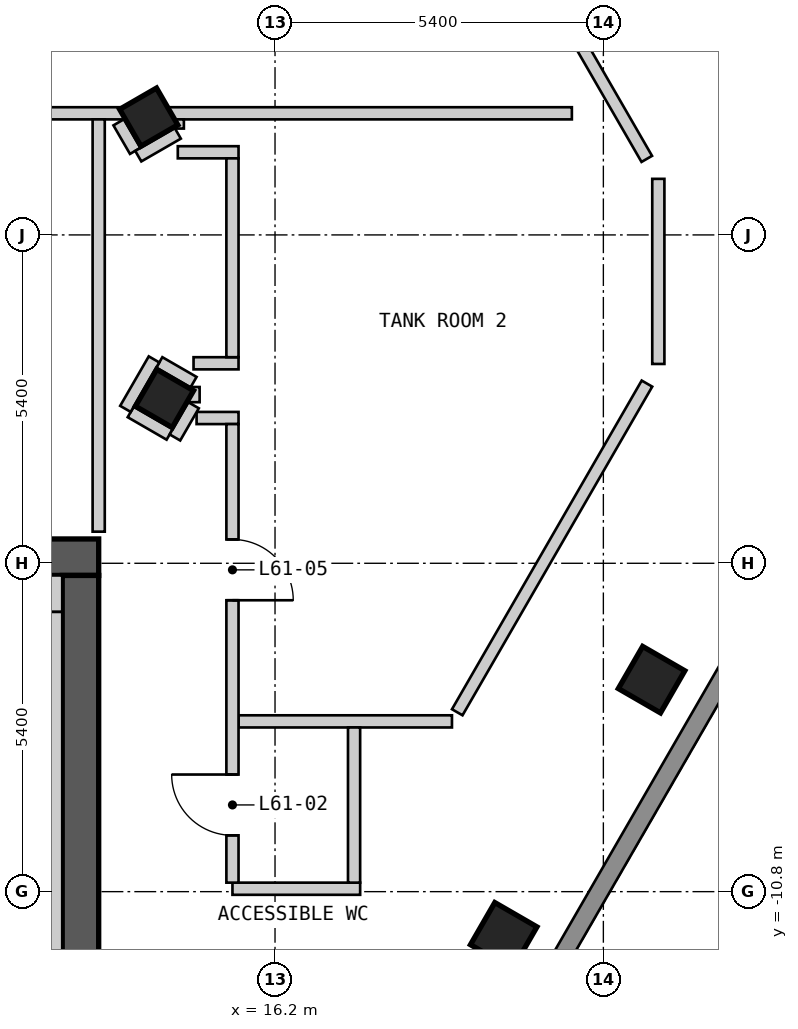
"""IFC4 building model, lengths in metres.
Left out: names, types, materials, properties, quantities, classifications, styles, units other than length and angle.
Written with IfcOpenShell. Run it as: python <this file> out.ifc"""

import sys

from ifc_helpers import new_model, si_unit, direction, frame, frame_2d, origin, origin_2d, place, context, subcontext, project, spatial, polyline, rectangle, outline, extrude, element, fill, save


model = new_model("IFC4")
c1 = context("Model", 3, precision=1e-05, world=origin(), true_north=direction((0.0, 1.0)))
c2 = subcontext(c1, "Body", "Model", "MODEL_VIEW")
j1 = project(units=[si_unit("LENGTHUNIT", "METRE"), si_unit("PLANEANGLEUNIT", "RADIAN")], contexts=[c1])
p1 = place(None, origin())
s1 = spatial("IfcSite", under=j1, at=p1, CompositionType="ELEMENT")
p2 = place(p1, origin())
s2 = spatial("IfcBuilding", under=s1, at=p2, CompositionType="ELEMENT")
p3 = place(p2, frame((0.0, 0.0, 199.2)))
s3 = spatial("IfcBuildingStorey", under=s2, at=p3, CompositionType="ELEMENT", Elevation=199.2)
for number, where, z_axis, x_axis in (
    (1, (19.961, -11.526, 0.0), (0.0, 0.0, 1.0), (0.5, 0.866, 0.0)),
    (2, (22.393, -7.314, 0.0), (0.0, 0.0, 1.0), (0.5, 0.866, 0.0)),
):
    element("IfcColumn", number, at=place(p3, frame(where, z_axis=z_axis, x_axis=x_axis)), inside=s3, PredefinedType="COLUMN", context=c2, shape_type="SweptSolid", body=[
        extrude(rectangle(XDim=0.8, YDim=0.8, at=origin_2d()), origin(), (0.0, 0.0, 1.0), 3.6),
    ])
for number, where, z_axis, x_axis in (
    (3, (14.382, -2.689, 0.0), (0.0, 0.0, 1.0), (0.5, 0.866, 0.0)),
    (4, (14.123, 1.937, 0.0), (0.0, 0.0, 1.0), (-0.5, 0.866, 0.0)),
):
    element("IfcColumn", number, at=place(p3, frame(where, z_axis=z_axis, x_axis=x_axis)), inside=s3, PredefinedType="COLUMN", context=c2, shape_type="SweptSolid", body=[
        extrude(rectangle(XDim=0.7, YDim=0.7, at=origin_2d()), origin(), (0.0, 0.0, 1.0), 3.6),
    ])
p4 = place(p3, frame((-13.3, -5.3, 0.0), z_axis=(0.0, 0.0, 1.0), x_axis=(1.0, 0.0, 0.0)))
e5 = element("IfcWall", 5, at=p4, inside=s3, PredefinedType="SHEAR", context=c2, shape_type="SweptSolid", body=[
    extrude(rectangle(XDim=26.6, YDim=0.6, at=frame_2d((13.3, 0.0))), origin(), (0.0, 0.0, 1.0), 2.6),
])
p5 = place(p4, frame((23.65, 0.0, 0.0)))
e6 = element("IfcOpeningElement", 6, at=p5, cuts=e5, PredefinedType="OPENING", context=c2, shape_type="SweptSolid", body=[
    extrude(rectangle(XDim=1.2, YDim=2.1, at=frame_2d((0.6, 1.05))), frame((0.0, 0.31, 0.0), z_axis=(0.0, -1.0, 0.0), x_axis=(1.0, 0.0, 0.0)), (0.0, 0.0, 1.0), 0.62),
])
p6 = place(p3, frame((13.0, -18.4, 0.0), z_axis=(0.0, 0.0, 1.0), x_axis=(0.0, 1.0, 0.0)))
e7 = element("IfcWall", 7, at=p6, inside=s3, PredefinedType="SHEAR", context=c2, shape_type="SweptSolid", body=[
    extrude(rectangle(XDim=12.8, YDim=0.6, at=frame_2d((6.4, 0.0))), origin(), (0.0, 0.0, 1.0), 2.6),
])
p7 = place(p3, frame((15.631, -21.025, 0.0), z_axis=(0.0, 0.0, 1.0), x_axis=(0.500018670445, 0.86601462413, 0.0)))
e8 = element("IfcWall", 8, at=p7, inside=s3, PredefinedType="SOLIDWALL", context=c2, shape_type="SweptSolid", body=[
    extrude(outline(polyline([(0.0, -0.15), (20.785, -0.15), (20.705, 0.15), (0.08, 0.15), (0.0, -0.15)])), origin(), (0.0, 0.0, 1.0), 2.6),
])
p8 = place(p3, frame((26.024, 1.825, 0.0), z_axis=(0.0, 0.0, 1.0), x_axis=(-0.500010537973, 0.866019319597, 0.0)))
e9 = element("IfcWall", 9, at=p8, inside=s3, PredefinedType="SOLIDWALL", context=c2, shape_type="SweptSolid", body=[
    extrude(outline(polyline([(0.0, -0.15), (22.863, -0.15), (22.783, 0.15), (0.08, 0.15), (0.0, -0.15)])), origin(), (0.0, 0.0, 1.0), 2.6),
])
p9 = place(p3, frame((15.5, -10.752, 0.0), z_axis=(0.0, 0.0, 1.0), x_axis=(1.0, 0.0, 0.0)))
e10 = element("IfcWall", 10, at=p9, inside=s3, PredefinedType="PARTITIONING", context=c2, shape_type="SweptSolid", body=[
    extrude(rectangle(XDim=2.1, YDim=0.2, at=frame_2d((1.05, 0.0))), origin(), (0.0, 0.0, 1.0), 2.6),
])
p10 = place(p3, frame((15.6, -8.0, 0.0), z_axis=(0.0, 0.0, 1.0), x_axis=(1.0, 0.0, 0.0)))
e11 = element("IfcWall", 11, at=p10, inside=s3, PredefinedType="SOLIDWALL", context=c2, shape_type="SweptSolid", body=[
    extrude(rectangle(XDim=3.51, YDim=0.2, at=frame_2d((1.755, 0.0))), origin(), (0.0, 0.0, 1.0), 2.6),
])
p11 = place(p3, frame((14.91, -3.011, 0.0), z_axis=(0.0, 0.0, 1.0), x_axis=(1.0, 0.0, 0.0)))
e12 = element("IfcWall", 12, at=p11, inside=s3, PredefinedType="SOLIDWALL", context=c2, shape_type="SweptSolid", body=[
    extrude(rectangle(XDim=0.69, YDim=0.2, at=frame_2d((0.345, 0.0))), origin(), (0.0, 0.0, 1.0), 2.6),
])
p12 = place(p3, frame((14.86, -2.111, 0.0), z_axis=(0.0, 0.0, 1.0), x_axis=(1.0, 0.0, 0.0)))
e13 = element("IfcWall", 13, at=p12, inside=s3, PredefinedType="SOLIDWALL", context=c2, shape_type="SweptSolid", body=[
    extrude(rectangle(XDim=0.74, YDim=0.2, at=frame_2d((0.37, 0.0))), origin(), (0.0, 0.0, 1.0), 2.6),
])
p13 = place(p3, frame((14.601, 1.359, 0.0), z_axis=(0.0, 0.0, 1.0), x_axis=(1.0, 0.0, 0.0)))
e14 = element("IfcWall", 14, at=p13, inside=s3, PredefinedType="SOLIDWALL", context=c2, shape_type="SweptSolid", body=[
    extrude(rectangle(XDim=0.999, YDim=0.2, at=frame_2d((0.5, 0.0))), origin(), (0.0, 0.0, 1.0), 2.6),
])
p14 = place(p3, frame((-21.482, 2.0, 0.0), z_axis=(0.0, 0.0, 1.0), x_axis=(1.0, 0.0, 0.0)))
e15 = element("IfcWall", 15, at=p14, inside=s3, PredefinedType="SOLIDWALL", context=c2, shape_type="SweptSolid", body=[
    extrude(rectangle(XDim=42.564, YDim=0.2, at=frame_2d((21.282, 0.0))), origin(), (0.0, 0.0, 1.0), 2.6),
])
p15 = place(p14, frame((4.432, 0.0, 0.0)))
e16 = element("IfcOpeningElement", 16, at=p15, cuts=e15, PredefinedType="OPENING", context=c2, shape_type="SweptSolid", body=[
    extrude(rectangle(XDim=1.0, YDim=2.1, at=frame_2d((0.5, 1.05))), frame((0.0, 0.11, 0.0), z_axis=(0.0, -1.0, 0.0), x_axis=(1.0, 0.0, 0.0)), (0.0, 0.0, 1.0), 0.22),
])
p16 = place(p14, frame((25.972, 0.0, 0.0)))
e17 = element("IfcOpeningElement", 17, at=p16, cuts=e15, PredefinedType="OPENING", context=c2, shape_type="SweptSolid", body=[
    extrude(rectangle(XDim=1.8, YDim=2.1, at=frame_2d((0.9, 1.05))), frame((0.0, 0.11, 0.0), z_axis=(0.0, -1.0, 0.0), x_axis=(1.0, 0.0, 0.0)), (0.0, 0.0, 1.0), 0.22),
])
p17 = place(p3, frame((13.3, -4.88, 0.0), z_axis=(0.0, 0.0, 1.0), x_axis=(0.0, 1.0, 0.0)))
e18 = element("IfcWall", 18, at=p17, inside=s3, PredefinedType="PARTITIONING", context=c2, shape_type="SweptSolid", body=[
    extrude(rectangle(XDim=6.78, YDim=0.2, at=frame_2d((3.39, 0.0))), origin(), (0.0, 0.0, 1.0), 2.6),
])
p18 = place(p3, frame((14.601, 1.749, 0.0), z_axis=(0.0, 0.0, 1.0), x_axis=(0.0, 1.0, 0.0)))
e19 = element("IfcWall", 19, at=p18, inside=s3, PredefinedType="SOLIDWALL", context=c2, shape_type="SweptSolid", body=[
    extrude(rectangle(XDim=0.151, YDim=0.2, at=frame_2d((0.075, 0.0))), origin(), (0.0, 0.0, 1.0), 2.6),
])
p19 = place(p3, frame((14.86, -2.751, 0.0), z_axis=(0.0, 0.0, 1.0), x_axis=(0.0, 1.0, 0.0)))
e20 = element("IfcWall", 20, at=p19, inside=s3, PredefinedType="SOLIDWALL", context=c2, shape_type="SweptSolid", body=[
    extrude(rectangle(XDim=0.25, YDim=0.2, at=frame_2d((0.125, 0.0))), origin(), (0.0, 0.0, 1.0), 2.6),
])
p20 = place(p3, frame((15.5, -10.652, 0.0), z_axis=(0.0, 0.0, 1.0), x_axis=(0.0, 1.0, 0.0)))
e21 = element("IfcWall", 21, at=p20, inside=s3, PredefinedType="SOLIDWALL", context=c2, shape_type="SweptSolid", body=[
    extrude(rectangle(XDim=7.541, YDim=0.2, at=frame_2d((3.771, 0.0))), origin(), (0.0, 0.0, 1.0), 2.6),
])
p21 = place(p20, frame((1.778, 0.0, 0.0), z_axis=(0.0, 0.0, 1.0), x_axis=(-1.0, 0.0, 0.0)))
e22 = element("IfcOpeningElement", 22, at=p21, cuts=e21, PredefinedType="OPENING", context=c2, shape_type="SweptSolid", body=[
    extrude(rectangle(XDim=1.0, YDim=2.1, at=frame_2d((0.5, 1.05))), frame((0.0, 0.11, 0.0), z_axis=(0.0, -1.0, 0.0), x_axis=(1.0, 0.0, 0.0)), (0.0, 0.0, 1.0), 0.22),
])
p22 = place(p20, frame((5.644, 0.0, 0.0), z_axis=(0.0, 0.0, 1.0), x_axis=(-1.0, 0.0, 0.0)))
e23 = element("IfcOpeningElement", 23, at=p22, cuts=e21, PredefinedType="OPENING", context=c2, shape_type="SweptSolid", body=[
    extrude(rectangle(XDim=1.0, YDim=2.1, at=frame_2d((0.5, 1.05))), frame((0.0, 0.11, 0.0), z_axis=(0.0, -1.0, 0.0), x_axis=(1.0, 0.0, 0.0)), (0.0, 0.0, 1.0), 0.22),
])
p23 = place(p3, frame((15.5, -2.011, 0.0), z_axis=(0.0, 0.0, 1.0), x_axis=(0.0, 1.0, 0.0)))
e24 = element("IfcWall", 24, at=p23, inside=s3, PredefinedType="SOLIDWALL", context=c2, shape_type="SweptSolid", body=[
    extrude(rectangle(XDim=3.27, YDim=0.2, at=frame_2d((1.635, 0.0))), origin(), (0.0, 0.0, 1.0), 2.6),
])
p24 = place(p3, frame((17.5, -10.652, 0.0), z_axis=(0.0, 0.0, 1.0), x_axis=(0.0, 1.0, 0.0)))
e25 = element("IfcWall", 25, at=p24, inside=s3, PredefinedType="PARTITIONING", context=c2, shape_type="SweptSolid", body=[
    extrude(rectangle(XDim=2.552, YDim=0.2, at=frame_2d((1.276, 0.0))), origin(), (0.0, 0.0, 1.0), 2.6),
])
p25 = place(p3, frame((22.504, -2.122, 0.0), z_axis=(0.0, 0.0, 1.0), x_axis=(0.0, 1.0, 0.0)))
e26 = element("IfcWall", 26, at=p25, inside=s3, PredefinedType="SOLIDWALL", context=c2, shape_type="SweptSolid", body=[
    extrude(rectangle(XDim=3.044, YDim=0.2, at=frame_2d((1.522, 0.0))), origin(), (0.0, 0.0, 1.0), 2.6),
])
p26 = place(p3, frame((14.297, -2.097, 0.0), z_axis=(0.0, 0.0, 1.0), x_axis=(0.865922902183, -0.50017749597, 0.0)))
e27 = element("IfcWall", 27, at=p26, inside=s3, PredefinedType="SOLIDWALL", context=c2, shape_type="SweptSolid", body=[
    extrude(rectangle(XDim=0.65, YDim=0.2, at=frame_2d((0.325, 0.0))), origin(), (0.0, 0.0, 1.0), 2.6),
])
p27 = place(p3, frame((13.827, -2.911, 0.0), z_axis=(0.0, 0.0, 1.0), x_axis=(0.86571247639, -0.500541614877, 0.0)))
e28 = element("IfcWall", 28, at=p27, inside=s3, PredefinedType="SOLIDWALL", context=c2, shape_type="SweptSolid", body=[
    extrude(rectangle(XDim=0.74, YDim=0.2, at=frame_2d((0.37, 0.0))), origin(), (0.0, 0.0, 1.0), 2.6),
])
p28 = place(p3, frame((13.629, 1.852, 0.0), z_axis=(0.0, 0.0, 1.0), x_axis=(0.500876749519, -0.86551862013, 0.0)))
e29 = element("IfcWall", 29, at=p28, inside=s3, PredefinedType="SOLIDWALL", context=c2, shape_type="SweptSolid", body=[
    extrude(rectangle(XDim=0.543, YDim=0.2, at=frame_2d((0.271, 0.0))), origin(), (0.0, 0.0, 1.0), 2.6),
])
p29 = place(p3, frame((12.237, 18.705, 0.0), z_axis=(0.0, 0.0, 1.0), x_axis=(0.499970611561, -0.866042370543, 0.0)))
e30 = element("IfcWall", 30, at=p29, inside=s3, PredefinedType="SOLIDWALL", context=c2, shape_type="SweptSolid", body=[
    extrude(rectangle(XDim=20.155, YDim=0.2, at=frame_2d((10.078, 0.0))), origin(), (0.0, 0.0, 1.0), 2.6),
])
p30 = place(p3, frame((13.951, 1.295, 0.0), z_axis=(0.0, 0.0, 1.0), x_axis=(0.866234320545, 0.499637970844, 0.0)))
e31 = element("IfcWall", 31, at=p30, inside=s3, PredefinedType="SOLIDWALL", context=c2, shape_type="SweptSolid", body=[
    extrude(rectangle(XDim=0.75, YDim=0.2, at=frame_2d((0.375, 0.0))), origin(), (0.0, 0.0, 1.0), 2.6),
])
p31 = place(p3, frame((13.74, -2.861, 0.0), z_axis=(0.0, 0.0, 1.0), x_axis=(0.500022248069, 0.866012558475, 0.0)))
e32 = element("IfcWall", 32, at=p31, inside=s3, PredefinedType="SOLIDWALL", context=c2, shape_type="SweptSolid", body=[
    extrude(rectangle(XDim=0.94, YDim=0.2, at=frame_2d((0.47, 0.0))), origin(), (0.0, 0.0, 1.0), 2.6),
])
p32 = place(p3, frame((14.554, -3.331, 0.0), z_axis=(0.0, 0.0, 1.0), x_axis=(0.500171270639, 0.865926498051, 0.0)))
e33 = element("IfcWall", 33, at=p32, inside=s3, PredefinedType="SOLIDWALL", context=c2, shape_type="SweptSolid", body=[
    extrude(rectangle(XDim=0.612, YDim=0.2, at=frame_2d((0.306, 0.0))), origin(), (0.0, 0.0, 1.0), 2.6),
])
p33 = place(p3, frame((19.197, -7.85, 0.0), z_axis=(0.0, 0.0, 1.0), x_axis=(0.499913221443, 0.866075499611, 0.0)))
e34 = element("IfcWall", 34, at=p33, inside=s3, PredefinedType="SOLIDWALL", context=c2, shape_type="SweptSolid", body=[
    extrude(rectangle(XDim=6.241, YDim=0.2, at=frame_2d((3.12, 0.0))), origin(), (0.0, 0.0, 1.0), 2.6),
])
p34 = place(p3, frame((11.55, -5.9, 0.0), z_axis=(0.0, 0.0, 1.0), x_axis=(1.0, 0.0, 0.0)))
e35 = element("IfcWall", 35, at=p34, inside=s3, PredefinedType="PARTITIONING", context=c2, shape_type="SweptSolid", body=[
    extrude(rectangle(XDim=1.15, YDim=0.6, at=frame_2d((0.575, 0.0))), origin(), (0.0, 0.0, 1.0), 2.6),
])
p35 = place(p3, frame((12.4, -14.45, 0.0), z_axis=(0.0, 0.0, 1.0), x_axis=(0.0, 1.0, 0.0)))
e36 = element("IfcWall", 36, at=p35, inside=s3, PredefinedType="PARTITIONING", context=c2, shape_type="SweptSolid", body=[
    extrude(rectangle(XDim=8.25, YDim=0.6, at=frame_2d((4.125, 0.0))), origin(), (0.0, 0.0, 1.0), 2.6),
])
p36 = place(p21, origin())
e37 = element("IfcDoor", 37, at=p36, inside=s3, OperationType="SINGLE_SWING_LEFT", PredefinedType="DOOR", context=c2, shape_type="SweptSolid", body=[
    extrude(rectangle(XDim=1.0, YDim=2.1, at=frame_2d((0.5, 1.05))), frame((0.0, 0.025, 0.0), z_axis=(0.0, -1.0, 0.0), x_axis=(1.0, 0.0, 0.0)), (0.0, 0.0, 1.0), 0.05),
])
fill(e22, e37)
p37 = place(p22, origin())
e38 = element("IfcDoor", 38, at=p37, inside=s3, OperationType="SINGLE_SWING_RIGHT", PredefinedType="DOOR", context=c2, shape_type="SweptSolid", body=[
    extrude(rectangle(XDim=1.0, YDim=2.1, at=frame_2d((0.5, 1.05))), frame((0.0, 0.025, 0.0), z_axis=(0.0, -1.0, 0.0), x_axis=(1.0, 0.0, 0.0)), (0.0, 0.0, 1.0), 0.05),
])
fill(e23, e38)
save(model, sys.argv[1])
